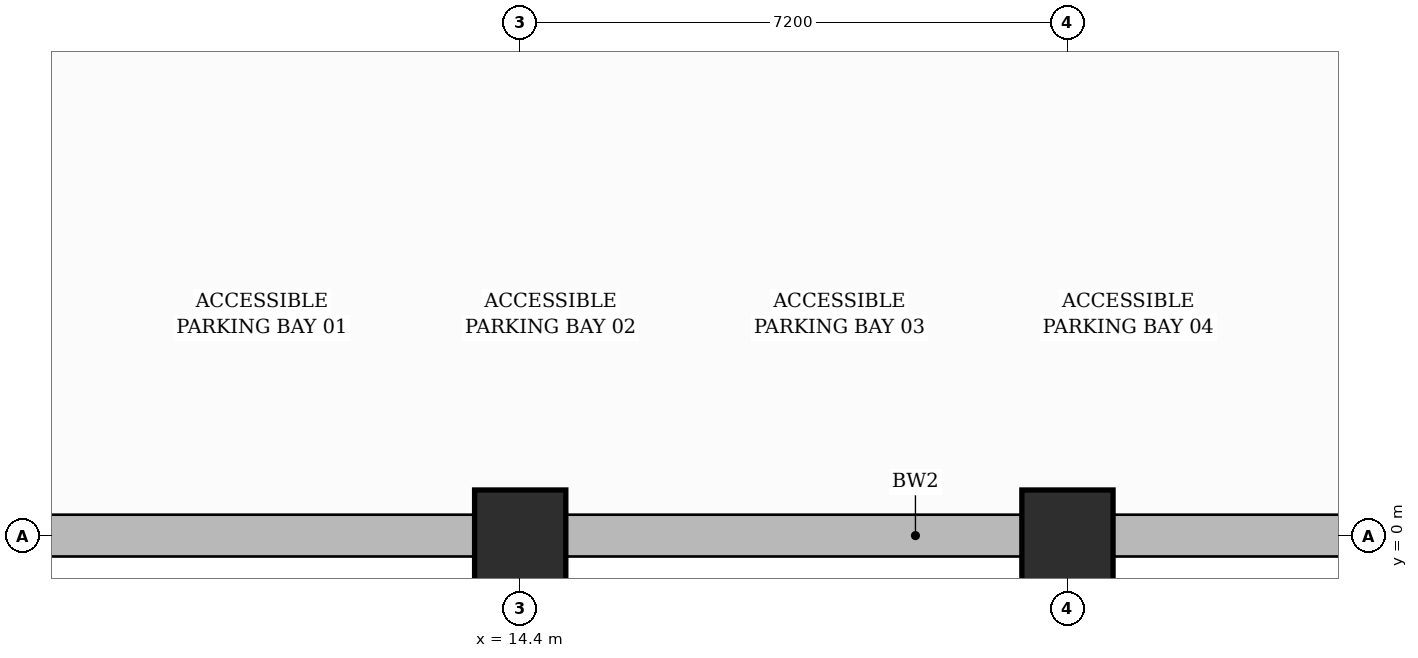
"""IFC4 building model, lengths in metres.
Left out: names, types, materials, properties, quantities, classifications, styles, units other than length and angle.
Written with IfcOpenShell. Run it as: python <this file> out.ifc"""

import sys

from ifc_helpers import new_model, si_unit, direction, frame, frame_2d, origin, origin_2d, place, context, subcontext, project, spatial, rectangle, extrude, source, transform, mapped, element, save


model = new_model("IFC4")
c1 = context("Model", 3, precision=1e-05, world=origin(), true_north=direction((0.0, 1.0)))
c2 = subcontext(c1, "Body", "Model", "MODEL_VIEW")
j1 = project(units=[si_unit("LENGTHUNIT", "METRE"), si_unit("PLANEANGLEUNIT", "RADIAN")], contexts=[c1])
p1 = place(None, origin())
s1 = spatial("IfcSite", under=j1, at=p1, CompositionType="ELEMENT")
p2 = place(p1, origin())
s2 = spatial("IfcBuilding", under=s1, at=p2, CompositionType="ELEMENT")
p3 = place(p2, frame((0.0, 0.0, -6.5)))
s3 = spatial("IfcBuildingStorey", under=s2, at=p3, CompositionType="ELEMENT", Elevation=-6.5)
p4 = place(p3, frame((-4.8, 0.0, 0.0), z_axis=(0.0, 0.0, 1.0), x_axis=(1.0, 0.0, 0.0)))
e1 = element("IfcWall", 1, at=p4, inside=s3, PredefinedType="USERDEFINED", context=c2, shape_type="SweptSolid", body=[
    extrude(rectangle(XDim=85.2, YDim=0.55, at=frame_2d((42.6, 0.0))), origin(), (0.0, 0.0, 1.0), 6.5),
])
m1 = source(origin(), c2, "Body", "SweptSolid", [
    extrude(rectangle(XDim=1.2, YDim=1.2, at=origin_2d()), origin(), (0.0, 0.0, 1.0), 6.5),
])
for number, where, z_axis, x_axis in (
    (2, (14.4, 0.0, 0.0), (0.0, 0.0, 1.0), (1.0, 0.0, 0.0)),
    (3, (21.6, 0.0, 0.0), (0.0, 0.0, 1.0), (1.0, 0.0, 0.0)),
):
    element("IfcColumn", number, at=place(p3, frame(where, z_axis=z_axis, x_axis=x_axis)), inside=s3, PredefinedType="COLUMN", context=c2, shape_type="MappedRepresentation", body=[
        mapped(m1, transform((0.0, 0.0, 0.0), scale=1.0)),
    ])
save(model, sys.argv[1])
